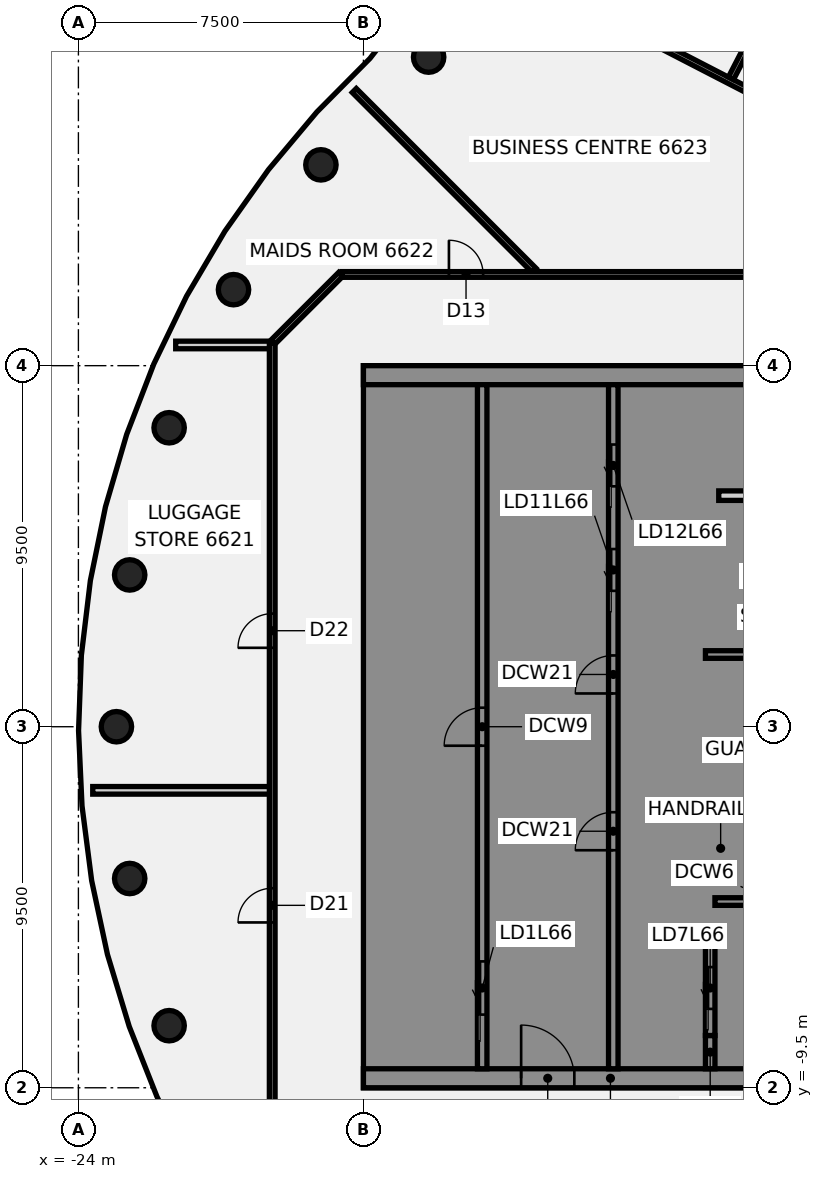
"""IFC4 building model, lengths in metres.
Left out: names, types, materials, properties, quantities, classifications, styles, units other than length and angle.
Written with IfcOpenShell. Run it as: python <this file> out.ifc"""

import sys

from ifc_helpers import new_model, si_unit, direction, frame, frame_2d, origin, origin_2d, place, context, subcontext, project, spatial, polyline, rectangle, circle, outline, extrude, element, fill, save


model = new_model("IFC4")
c1 = context("Model", 3, precision=1e-05, world=origin(), true_north=direction((0.0, 1.0)))
c2 = subcontext(c1, "Body", "Model", "MODEL_VIEW")
j1 = project(units=[si_unit("LENGTHUNIT", "METRE"), si_unit("PLANEANGLEUNIT", "RADIAN")], contexts=[c1])
p1 = place(None, origin())
s1 = spatial("IfcSite", under=j1, at=p1, CompositionType="ELEMENT")
p2 = place(p1, origin())
s2 = spatial("IfcBuilding", under=s1, at=p2, CompositionType="ELEMENT")
p3 = place(p2, frame((0.0, 0.0, 260.4)))
s3 = spatial("IfcBuildingStorey", under=s2, at=p3, CompositionType="ELEMENT", Elevation=260.4)
for number, where, z_axis, x_axis in (
    (1, (-14.784, 17.619, -0.14), (0.0, 0.0, 1.0), (1.0, 0.0, 0.0)),
    (2, (-17.619, 14.784, -0.14), (0.0, 0.0, 1.0), (1.0, 0.0, 0.0)),
    (3, (-19.919, 11.5, -0.14), (0.0, 0.0, 1.0), (1.0, 0.0, 0.0)),
    (4, (-21.613, 7.866, -0.14), (0.0, 0.0, 1.0), (1.0, 0.0, 0.0)),
    (5, (-22.651, 3.994, -0.14), (0.0, 0.0, 1.0), (1.0, 0.0, 0.0)),
    (6, (-23.0, 0.0, -0.14), (0.0, 0.0, 1.0), (1.0, 0.0, 0.0)),
    (7, (-22.651, -3.994, -0.14), (0.0, 0.0, 1.0), (1.0, 0.0, 0.0)),
    (8, (-21.613, -7.866, -0.14), (0.0, 0.0, 1.0), (1.0, 0.0, 0.0)),
):
    element("IfcColumn", number, at=place(p3, frame(where, z_axis=z_axis, x_axis=x_axis)), inside=s3, PredefinedType="COLUMN", context=c2, shape_type="SweptSolid", body=[
        extrude(circle(Radius=0.4, at=origin_2d()), origin(), (0.0, 0.0, 1.0), 3.6),
    ])
p4 = place(p3, frame((-16.74, 16.74, 0.0), z_axis=(0.0, 0.0, 1.0), x_axis=(0.707106781187, -0.707106781187, 0.0)))
e9 = element("IfcWall", 9, at=p4, inside=s3, PredefinedType="PARTITIONING", context=c2, shape_type="SweptSolid", body=[
    extrude(rectangle(XDim=6.691, YDim=0.15, at=frame_2d((3.345, 0.0))), origin(), (0.0, 0.0, 1.0), 2.864),
])
p5 = place(p3, frame((-15.098, 21.244, 0.0), z_axis=(0.0, 0.0, 1.0), x_axis=(0.888519040902, -0.458839747575, 0.0)))
e10 = element("IfcWall", 10, at=p5, inside=s3, PredefinedType="PARTITIONING", context=c2, shape_type="SweptSolid", body=[
    extrude(rectangle(XDim=20.094, YDim=0.15, at=frame_2d((10.047, 0.0))), origin(), (0.0, 0.0, 1.0), 2.864),
])
p6 = place(p5, frame((13.018, 0.0, 0.0)))
e11 = element("IfcOpeningElement", 11, at=p6, cuts=e10, PredefinedType="OPENING", context=c2, shape_type="SweptSolid", body=[
    extrude(rectangle(XDim=1.8, YDim=2.1, at=frame_2d((0.9, 1.05))), frame((0.0, 0.085, 0.0), z_axis=(0.0, -1.0, 0.0), x_axis=(1.0, 0.0, 0.0)), (0.0, 0.0, 1.0), 0.17),
])
p7 = place(p3, frame((-23.623, -1.674, 0.0), z_axis=(0.0, 0.0, 1.0), x_axis=(1.0, 0.0, 0.0)))
e12 = element("IfcWall", 12, at=p7, inside=s3, PredefinedType="PARTITIONING", context=c2, shape_type="SweptSolid", body=[
    extrude(rectangle(XDim=4.668, YDim=0.2, at=frame_2d((2.334, 0.0))), origin(), (0.0, 0.0, 1.0), 2.864),
])
p8 = place(p3, frame((-21.44, 10.045, 0.0), z_axis=(0.0, 0.0, 1.0), x_axis=(1.0, 0.0, 0.0)))
e13 = element("IfcWall", 13, at=p8, inside=s3, PredefinedType="PARTITIONING", context=c2, shape_type="SweptSolid", body=[
    extrude(rectangle(XDim=2.485, YDim=0.2, at=frame_2d((1.242, 0.0))), origin(), (0.0, 0.0, 1.0), 2.864),
])
p9 = place(p3, frame((-17.065, 11.9, 0.0), z_axis=(0.0, 0.0, 1.0), x_axis=(1.0, 0.0, 0.0)))
e14 = element("IfcWall", 14, at=p9, inside=s3, PredefinedType="PARTITIONING", context=c2, shape_type="SweptSolid", body=[
    extrude(rectangle(XDim=34.165, YDim=0.15, at=frame_2d((17.083, 0.0))), origin(), (0.0, 0.0, 1.0), 2.864),
])
p10 = place(p9, frame((22.91, 0.0, 0.0)))
e15 = element("IfcOpeningElement", 15, at=p10, cuts=e14, PredefinedType="OPENING", context=c2, shape_type="SweptSolid", body=[
    extrude(rectangle(XDim=1.8, YDim=2.1, at=frame_2d((0.9, 1.05))), frame((0.0, 0.085, 0.0), z_axis=(0.0, -1.0, 0.0), x_axis=(1.0, 0.0, 0.0)), (0.0, 0.0, 1.0), 0.17),
])
p11 = place(p9, frame((30.465, 0.0, 0.0)))
e16 = element("IfcOpeningElement", 16, at=p11, cuts=e14, PredefinedType="OPENING", context=c2, shape_type="SweptSolid", body=[
    extrude(rectangle(XDim=0.9, YDim=2.1, at=frame_2d((0.45, 1.05))), frame((0.0, 0.085, 0.0), z_axis=(0.0, -1.0, 0.0), x_axis=(1.0, 0.0, 0.0)), (0.0, 0.0, 1.0), 0.17),
])
p12 = place(p9, frame((2.815, 0.0, 0.0)))
e17 = element("IfcOpeningElement", 17, at=p12, cuts=e14, PredefinedType="OPENING", context=c2, shape_type="SweptSolid", body=[
    extrude(rectangle(XDim=0.9, YDim=2.1, at=frame_2d((0.45, 1.05))), frame((0.0, 0.085, 0.0), z_axis=(0.0, -1.0, 0.0), x_axis=(1.0, 0.0, 0.0)), (0.0, 0.0, 1.0), 0.17),
])
p13 = place(p9, frame((11.765, 0.0, 0.0)))
e18 = element("IfcOpeningElement", 18, at=p13, cuts=e14, PredefinedType="OPENING", context=c2, shape_type="SweptSolid", body=[
    extrude(rectangle(XDim=1.8, YDim=2.1, at=frame_2d((0.9, 1.05))), frame((0.0, 0.085, 0.0), z_axis=(0.0, -1.0, 0.0), x_axis=(1.0, 0.0, 0.0)), (0.0, 0.0, 1.0), 0.17),
])
p14 = place(p3, frame((-18.886, 10.114, 0.0), z_axis=(0.0, 0.0, 1.0), x_axis=(0.707106781187, 0.707106781187, 0.0)))
e19 = element("IfcWall", 19, at=p14, inside=s3, PredefinedType="PARTITIONING", context=c2, shape_type="SweptSolid", body=[
    extrude(rectangle(XDim=2.526, YDim=0.15, at=frame_2d((1.263, 0.0))), origin(), (0.0, 0.0, 1.0), 2.864),
])
p15 = place(p3, frame((-6.827, 17.062, 0.0), z_axis=(0.0, 0.0, 1.0), x_axis=(0.459003045801, 0.888434693123, 0.0)))
e20 = element("IfcWall", 20, at=p15, inside=s3, PredefinedType="PARTITIONING", context=c2, shape_type="SweptSolid", body=[
    extrude(rectangle(XDim=6.043, YDim=0.15, at=frame_2d((3.022, 0.0))), origin(), (0.0, 0.0, 1.0), 2.864),
])
p16 = place(p3, frame((-18.9, -10.1, 0.0), z_axis=(0.0, 0.0, 1.0), x_axis=(0.0, 1.0, 0.0)))
e21 = element("IfcWall", 21, at=p16, inside=s3, PredefinedType="PARTITIONING", context=c2, shape_type="SweptSolid", body=[
    extrude(rectangle(XDim=20.2, YDim=0.15, at=frame_2d((10.1, 0.0))), origin(), (0.0, 0.0, 1.0), 2.864),
])
p17 = place(p16, frame((4.95, 0.0, 0.0)))
e22 = element("IfcOpeningElement", 22, at=p17, cuts=e21, PredefinedType="OPENING", context=c2, shape_type="SweptSolid", body=[
    extrude(rectangle(XDim=0.9, YDim=2.1, at=frame_2d((0.45, 1.05))), frame((0.0, 0.085, 0.0), z_axis=(0.0, -1.0, 0.0), x_axis=(1.0, 0.0, 0.0)), (0.0, 0.0, 1.0), 0.17),
])
p18 = place(p16, frame((12.176, 0.0, 0.0)))
e23 = element("IfcOpeningElement", 23, at=p18, cuts=e21, PredefinedType="OPENING", context=c2, shape_type="SweptSolid", body=[
    extrude(rectangle(XDim=0.9, YDim=2.1, at=frame_2d((0.45, 1.05))), frame((0.0, 0.085, 0.0), z_axis=(0.0, -1.0, 0.0), x_axis=(1.0, 0.0, 0.0)), (0.0, 0.0, 1.0), 0.17),
])
p19 = place(p3, frame((-16.5, -9.25, 0.0), z_axis=(0.0, 0.0, 1.0), x_axis=(1.0, 0.0, 0.0)))
e24 = element("IfcWall", 24, at=p19, inside=s3, PredefinedType="SHEAR", context=c2, shape_type="SweptSolid", body=[
    extrude(rectangle(XDim=13.0, YDim=0.5, at=frame_2d((6.5, 0.0))), origin(), (0.0, 0.0, 1.0), 3.46),
])
p20 = place(p19, frame((4.15, 0.0, 0.0)))
e25 = element("IfcOpeningElement", 25, at=p20, cuts=e24, PredefinedType="OPENING", context=c2, shape_type="SweptSolid", body=[
    extrude(rectangle(XDim=1.4, YDim=2.1, at=frame_2d((0.7, 1.05))), frame((0.0, 0.26, 0.0), z_axis=(0.0, -1.0, 0.0), x_axis=(1.0, 0.0, 0.0)), (0.0, 0.0, 1.0), 0.52),
])
p21 = place(p19, frame((10.125, 0.0, 0.0)))
e26 = element("IfcOpeningElement", 26, at=p21, cuts=e24, PredefinedType="OPENING", context=c2, shape_type="SweptSolid", body=[
    extrude(rectangle(XDim=1.4, YDim=2.1, at=frame_2d((0.7, 1.05))), frame((0.0, 0.26, 0.0), z_axis=(0.0, -1.0, 0.0), x_axis=(1.0, 0.0, 0.0)), (0.0, 0.0, 1.0), 0.52),
])
p22 = place(p3, origin())
e27 = element("IfcWall", 27, at=p22, inside=s3, PredefinedType="SHEAR", context=c2, shape_type="SweptSolid", body=[
    extrude(outline(polyline([(-13.5, -8.125), (-16.0, -8.125), (-16.0, -5.625), (-13.5, -5.625), (-13.5, -5.375), (-16.0, -5.375), (-16.0, 5.375), (-13.5, 5.375), (-13.5, 5.625), (-16.0, 5.625), (-16.0, 8.125), (-13.5, 8.125), (-13.5, 9.0), (-16.0, 9.0), (-16.5, 9.0), (-16.5, -9.0), (-16.0, -9.0), (-13.5, -9.0), (-13.5, -8.125)])), origin(), (0.0, 0.0, 1.0), 3.46),
])
p23 = place(p3, frame((-16.5, 9.25, 0.0), z_axis=(0.0, 0.0, 1.0), x_axis=(1.0, 0.0, 0.0)))
e28 = element("IfcWall", 28, at=p23, inside=s3, PredefinedType="SHEAR", context=c2, shape_type="SweptSolid", body=[
    extrude(rectangle(XDim=13.0, YDim=0.5, at=frame_2d((6.5, 0.0))), origin(), (0.0, 0.0, 1.0), 3.46),
])
p24 = place(p3, origin())
e29 = element("IfcWall", 29, at=p24, inside=s3, PredefinedType="SHEAR", context=c2, shape_type="SweptSolid", body=[
    extrude(outline(polyline([(-9.8, -5.375), (-9.8, -5.625), (-7.5, -5.625), (-7.25, -5.625), (-7.25, 9.0), (-7.5, 9.0), (-9.8, 9.0), (-9.8, 8.125), (-7.5, 8.125), (-7.5, 5.625), (-9.8, 5.625), (-9.8, 5.375), (-7.5, 5.375), (-7.5, 2.875), (-9.8, 2.875), (-9.8, 2.625), (-7.5, 2.625), (-7.5, -5.375), (-9.8, -5.375)])), origin(), (0.0, 0.0, 1.0), 3.46),
])
p25 = place(p3, origin())
e30 = element("IfcWall", 30, at=p25, inside=s3, PredefinedType="SHEAR", context=c2, shape_type="SweptSolid", body=[
    extrude(outline(polyline([(-7.5, -8.125), (-9.55, -8.125), (-9.55, -5.625), (-9.8, -5.625), (-9.8, -8.125), (-9.8, -9.0), (-7.5, -9.0), (-7.5, -8.125)])), origin(), (0.0, 0.0, 1.0), 3.46),
])
p26 = place(p3, frame((-7.375, -9.0, 0.0), z_axis=(0.0, 0.0, 1.0), x_axis=(0.0, 1.0, 0.0)))
e31 = element("IfcWall", 31, at=p26, inside=s3, PredefinedType="SHEAR", context=c2, shape_type="SweptSolid", body=[
    extrude(rectangle(XDim=0.875, YDim=0.25, at=frame_2d((0.438, 0.0))), origin(), (0.0, 0.0, 1.0), 3.46),
])
p27 = place(p3, frame((-7.5, 1.9, 0.0), z_axis=(0.0, 0.0, 1.0), x_axis=(1.0, 0.0, 0.0)))
e32 = element("IfcWall", 32, at=p27, inside=s3, PredefinedType="SHEAR", context=c2, shape_type="SweptSolid", body=[
    extrude(rectangle(XDim=3.3, YDim=0.2, at=frame_2d((1.65, 0.0))), origin(), (0.0, 0.0, 1.0), 3.46),
])
p28 = place(p3, frame((-13.375, -9.0, 0.0), z_axis=(0.0, 0.0, 1.0), x_axis=(0.0, 1.0, 0.0)))
e33 = element("IfcWall", 33, at=p28, inside=s3, PredefinedType="SHEAR", context=c2, shape_type="SweptSolid", body=[
    extrude(rectangle(XDim=18.0, YDim=0.25, at=frame_2d((9.0, 0.0))), origin(), (0.0, 0.0, 1.0), 3.46),
])
p29 = place(p28, frame((1.425, 0.0, 0.0)))
e34 = element("IfcOpeningElement", 34, at=p29, cuts=e33, PredefinedType="OPENING", context=c2, shape_type="SweptSolid", body=[
    extrude(rectangle(XDim=1.4, YDim=2.1, at=frame_2d((0.7, 1.05))), frame((0.0, 0.135, 0.0), z_axis=(0.0, -1.0, 0.0), x_axis=(1.0, 0.0, 0.0)), (0.0, 0.0, 1.0), 0.27),
])
p30 = place(p28, frame((8.5, 0.0, 0.0)))
e35 = element("IfcOpeningElement", 35, at=p30, cuts=e33, PredefinedType="OPENING", context=c2, shape_type="SweptSolid", body=[
    extrude(rectangle(XDim=1.0, YDim=2.1, at=frame_2d((0.5, 1.05))), frame((0.0, 0.135, 0.0), z_axis=(0.0, -1.0, 0.0), x_axis=(1.0, 0.0, 0.0)), (0.0, 0.0, 1.0), 0.27),
])
p31 = place(p3, frame((-9.925, -9.0, 0.0), z_axis=(0.0, 0.0, 1.0), x_axis=(0.0, 1.0, 0.0)))
e36 = element("IfcWall", 36, at=p31, inside=s3, PredefinedType="SHEAR", context=c2, shape_type="SweptSolid", body=[
    extrude(rectangle(XDim=18.0, YDim=0.25, at=frame_2d((9.0, 0.0))), origin(), (0.0, 0.0, 1.0), 3.46),
])
p32 = place(p31, frame((12.575, 0.0, 0.0)))
e37 = element("IfcOpeningElement", 37, at=p32, cuts=e36, PredefinedType="OPENING", context=c2, shape_type="SweptSolid", body=[
    extrude(rectangle(XDim=1.1, YDim=2.1, at=frame_2d((0.55, 1.05))), frame((0.0, 0.135, 0.0), z_axis=(0.0, -1.0, 0.0), x_axis=(1.0, 0.0, 0.0)), (0.0, 0.0, 1.0), 0.27),
])
p33 = place(p31, frame((15.325, 0.0, 0.0)))
e38 = element("IfcOpeningElement", 38, at=p33, cuts=e36, PredefinedType="OPENING", context=c2, shape_type="SweptSolid", body=[
    extrude(rectangle(XDim=1.1, YDim=2.1, at=frame_2d((0.55, 1.05))), frame((0.0, 0.135, 0.0), z_axis=(0.0, -1.0, 0.0), x_axis=(1.0, 0.0, 0.0)), (0.0, 0.0, 1.0), 0.27),
])
p34 = place(p31, frame((5.75, 0.0, 0.0)))
e39 = element("IfcOpeningElement", 39, at=p34, cuts=e36, PredefinedType="OPENING", context=c2, shape_type="SweptSolid", body=[
    extrude(rectangle(XDim=1.0, YDim=2.1, at=frame_2d((0.5, 1.05))), frame((0.0, 0.135, 0.0), z_axis=(0.0, -1.0, 0.0), x_axis=(1.0, 0.0, 0.0)), (0.0, 0.0, 1.0), 0.27),
])
p35 = place(p31, frame((9.875, 0.0, 0.0)))
e40 = element("IfcOpeningElement", 40, at=p35, cuts=e36, PredefinedType="OPENING", context=c2, shape_type="SweptSolid", body=[
    extrude(rectangle(XDim=1.0, YDim=2.1, at=frame_2d((0.5, 1.05))), frame((0.0, 0.135, 0.0), z_axis=(0.0, -1.0, 0.0), x_axis=(1.0, 0.0, 0.0)), (0.0, 0.0, 1.0), 0.27),
])
p36 = place(p3, frame((-7.375, -8.125, 0.0), z_axis=(0.0, 0.0, 1.0), x_axis=(0.0, 1.0, 0.0)))
e41 = element("IfcWall", 41, at=p36, inside=s3, PredefinedType="SHEAR", context=c2, shape_type="SweptSolid", body=[
    extrude(rectangle(XDim=2.5, YDim=0.25, at=frame_2d((1.25, 0.0))), origin(), (0.0, 0.0, 1.0), 3.46),
])
p37 = place(p36, frame((0.7, 0.0, 0.0)))
e42 = element("IfcOpeningElement", 42, at=p37, cuts=e41, PredefinedType="OPENING", context=c2, shape_type="SweptSolid", body=[
    extrude(rectangle(XDim=1.1, YDim=2.1, at=frame_2d((0.55, 1.05))), frame((0.0, 0.135, 0.0), z_axis=(0.0, -1.0, 0.0), x_axis=(1.0, 0.0, 0.0)), (0.0, 0.0, 1.0), 0.27),
])
p38 = place(p3, frame((-7.15, 6.08, 0.0), z_axis=(0.0, 0.0, 1.0), x_axis=(1.0, 0.0, 0.0)))
e43 = element("IfcWall", 43, at=p38, inside=s3, PredefinedType="PARTITIONING", context=c2, shape_type="SweptSolid", body=[
    extrude(rectangle(XDim=2.95, YDim=0.25, at=frame_2d((1.475, 0.0))), origin(), (0.0, 0.0, 1.0), 3.46),
])
p39 = place(p3, frame((-7.25, -4.6, 0.0), z_axis=(0.0, 0.0, 1.0), x_axis=(1.0, 0.0, 0.0)))
e44 = element("IfcWall", 44, at=p39, inside=s3, PredefinedType="SHEAR", context=c2, shape_type="SweptSolid", body=[
    extrude(rectangle(XDim=3.25, YDim=0.2, at=frame_2d((1.625, 0.0))), origin(), (0.0, 0.0, 1.0), 3.46),
])
p40 = place(p39, frame((1.025, 0.0, 0.0)))
e45 = element("IfcOpeningElement", 45, at=p40, cuts=e44, PredefinedType="OPENING", context=c2, shape_type="SweptSolid", body=[
    extrude(rectangle(XDim=1.1, YDim=2.1, at=frame_2d((0.55, 1.05))), frame((0.0, 0.11, 0.0), z_axis=(0.0, -1.0, 0.0), x_axis=(1.0, 0.0, 0.0)), (0.0, 0.0, 1.0), 0.22),
])
p41 = place(p12, origin())
e46 = element("IfcDoor", 46, at=p41, inside=s3, OperationType="SINGLE_SWING_RIGHT", PredefinedType="DOOR", context=c2, shape_type="SweptSolid", body=[
    extrude(rectangle(XDim=0.9, YDim=2.1, at=frame_2d((0.45, 1.05))), frame((0.0, 0.025, 0.0), z_axis=(0.0, -1.0, 0.0), x_axis=(1.0, 0.0, 0.0)), (0.0, 0.0, 1.0), 0.05),
])
fill(e17, e46)
p42 = place(p17, origin())
e47 = element("IfcDoor", 47, at=p42, inside=s3, OperationType="SINGLE_SWING_RIGHT", PredefinedType="DOOR", context=c2, shape_type="SweptSolid", body=[
    extrude(rectangle(XDim=0.9, YDim=2.1, at=frame_2d((0.45, 1.05))), frame((0.0, 0.025, 0.0), z_axis=(0.0, -1.0, 0.0), x_axis=(1.0, 0.0, 0.0)), (0.0, 0.0, 1.0), 0.05),
])
fill(e22, e47)
p43 = place(p18, origin())
e48 = element("IfcDoor", 48, at=p43, inside=s3, OperationType="SINGLE_SWING_LEFT", PredefinedType="DOOR", context=c2, shape_type="SweptSolid", body=[
    extrude(rectangle(XDim=0.9, YDim=2.1, at=frame_2d((0.45, 1.05))), frame((0.0, 0.025, 0.0), z_axis=(0.0, -1.0, 0.0), x_axis=(1.0, 0.0, 0.0)), (0.0, 0.0, 1.0), 0.05),
])
fill(e23, e48)
p44 = place(p20, origin())
e49 = element("IfcDoor", 49, at=p44, inside=s3, OperationType="SINGLE_SWING_LEFT", PredefinedType="DOOR", context=c2, shape_type="SweptSolid", body=[
    extrude(rectangle(XDim=1.4, YDim=2.1, at=frame_2d((0.7, 1.05))), frame((0.0, 0.025, 0.0), z_axis=(0.0, -1.0, 0.0), x_axis=(1.0, 0.0, 0.0)), (0.0, 0.0, 1.0), 0.05),
])
fill(e25, e49)
p45 = place(p29, origin())
e50 = element("IfcDoor", 50, at=p45, inside=s3, OperationType="SLIDING_TO_LEFT", PredefinedType="DOOR", context=c2, shape_type="SweptSolid", body=[
    extrude(rectangle(XDim=1.4, YDim=2.1, at=frame_2d((0.7, 1.05))), frame((0.0, 0.025, 0.0), z_axis=(0.0, -1.0, 0.0), x_axis=(1.0, 0.0, 0.0)), (0.0, 0.0, 1.0), 0.05),
])
fill(e34, e50)
p46 = place(p37, origin())
e51 = element("IfcDoor", 51, at=p46, inside=s3, OperationType="SLIDING_TO_LEFT", PredefinedType="DOOR", context=c2, shape_type="SweptSolid", body=[
    extrude(rectangle(XDim=1.1, YDim=2.1, at=frame_2d((0.55, 1.05))), frame((0.0, 0.025, 0.0), z_axis=(0.0, -1.0, 0.0), x_axis=(1.0, 0.0, 0.0)), (0.0, 0.0, 1.0), 0.05),
])
fill(e42, e51)
p47 = place(p32, origin())
e52 = element("IfcDoor", 52, at=p47, inside=s3, OperationType="SLIDING_TO_LEFT", PredefinedType="DOOR", context=c2, shape_type="SweptSolid", body=[
    extrude(rectangle(XDim=1.1, YDim=2.1, at=frame_2d((0.55, 1.05))), frame((0.0, 0.025, 0.0), z_axis=(0.0, -1.0, 0.0), x_axis=(1.0, 0.0, 0.0)), (0.0, 0.0, 1.0), 0.05),
])
fill(e37, e52)
p48 = place(p33, origin())
e53 = element("IfcDoor", 53, at=p48, inside=s3, OperationType="SLIDING_TO_LEFT", PredefinedType="DOOR", context=c2, shape_type="SweptSolid", body=[
    extrude(rectangle(XDim=1.1, YDim=2.1, at=frame_2d((0.55, 1.05))), frame((0.0, 0.025, 0.0), z_axis=(0.0, -1.0, 0.0), x_axis=(1.0, 0.0, 0.0)), (0.0, 0.0, 1.0), 0.05),
])
fill(e38, e53)
p49 = place(p30, origin())
e54 = element("IfcDoor", 54, at=p49, inside=s3, OperationType="SINGLE_SWING_LEFT", PredefinedType="DOOR", context=c2, shape_type="SweptSolid", body=[
    extrude(rectangle(XDim=1.0, YDim=2.1, at=frame_2d((0.5, 1.05))), frame((0.0, 0.025, 0.0), z_axis=(0.0, -1.0, 0.0), x_axis=(1.0, 0.0, 0.0)), (0.0, 0.0, 1.0), 0.05),
])
fill(e35, e54)
p50 = place(p34, origin())
e55 = element("IfcDoor", 55, at=p50, inside=s3, OperationType="SINGLE_SWING_LEFT", PredefinedType="DOOR", context=c2, shape_type="SweptSolid", body=[
    extrude(rectangle(XDim=1.0, YDim=2.1, at=frame_2d((0.5, 1.05))), frame((0.0, 0.025, 0.0), z_axis=(0.0, -1.0, 0.0), x_axis=(1.0, 0.0, 0.0)), (0.0, 0.0, 1.0), 0.05),
])
fill(e39, e55)
p51 = place(p35, origin())
e56 = element("IfcDoor", 56, at=p51, inside=s3, OperationType="SINGLE_SWING_LEFT", PredefinedType="DOOR", context=c2, shape_type="SweptSolid", body=[
    extrude(rectangle(XDim=1.0, YDim=2.1, at=frame_2d((0.5, 1.05))), frame((0.0, 0.025, 0.0), z_axis=(0.0, -1.0, 0.0), x_axis=(1.0, 0.0, 0.0)), (0.0, 0.0, 1.0), 0.05),
])
fill(e40, e56)
save(model, sys.argv[1])
